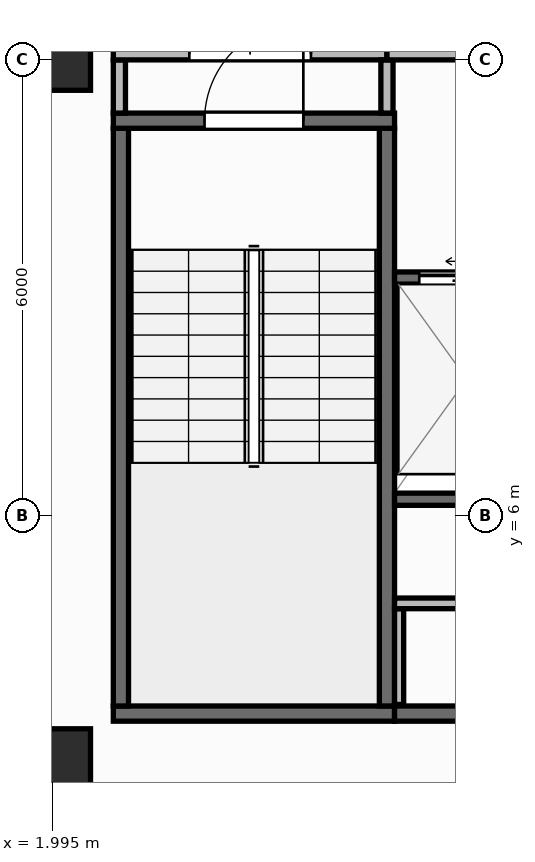
"""IFC4 building model, lengths in metres.
Left out: names, types, materials, properties, quantities, classifications, styles, units other than length and angle.
Written with IfcOpenShell. Run it as: python <this file> out.ifc"""

import sys

from ifc_helpers import new_model, si_unit, direction, frame, frame_2d, origin, origin_2d, place, context, subcontext, project, spatial, rectangle, extrude, element, fill, save


model = new_model("IFC4")
c1 = context("Model", 3, precision=1e-05, world=origin(), true_north=direction((0.0, 1.0)))
c2 = subcontext(c1, "Body", "Model", "MODEL_VIEW")
j1 = project(units=[si_unit("LENGTHUNIT", "METRE"), si_unit("PLANEANGLEUNIT", "RADIAN")], contexts=[c1])
p1 = place(None, origin())
s1 = spatial("IfcSite", under=j1, at=p1, CompositionType="ELEMENT")
p2 = place(p1, origin())
s2 = spatial("IfcBuilding", under=s1, at=p2, CompositionType="ELEMENT")
p3 = place(p2, frame((0.0, 0.0, 296.05)))
s3 = spatial("IfcBuildingStorey", under=s2, at=p3, CompositionType="ELEMENT", Elevation=296.05)
for number, where, z_axis, x_axis in (
    (1, (2.1, 2.8, 0.0), (0.0, 0.0, 1.0), (1.0, 0.0, 0.0)),
    (2, (2.1, 12.0, 0.0), (0.0, 0.0, 1.0), (1.0, 0.0, 0.0)),
):
    element("IfcColumn", number, at=place(p3, frame(where, z_axis=z_axis, x_axis=x_axis)), inside=s3, PredefinedType="COLUMN", context=c2, shape_type="SweptSolid", body=[
        extrude(rectangle(XDim=0.8, YDim=0.8, at=origin_2d()), origin(), (0.0, 0.0, 1.0), 3.95),
    ])
p4 = place(p3, frame((2.46, 0.171, 0.0), z_axis=(0.0, 0.0, 1.0), x_axis=(0.997760665813, 0.066885377746, 0.0)))
e3 = element("IfcWall", 3, at=p4, inside=s3, PredefinedType="STANDARD", context=c2, shape_type="SweptSolid", body=[
    extrude(rectangle(XDim=35.56, YDim=0.26, at=frame_2d((17.78, 0.0))), origin(), (0.0, 0.0, 1.0), 3.71),
])
p5 = place(p4, frame((16.58, 0.0, 0.9)))
e4 = element("IfcOpeningElement", 4, at=p5, cuts=e3, PredefinedType="OPENING", context=c2, shape_type="SweptSolid", body=[
    extrude(rectangle(XDim=2.4, YDim=1.65, at=frame_2d((1.2, 0.825))), frame((0.0, 0.14, 0.0), z_axis=(0.0, -1.0, 0.0), x_axis=(1.0, 0.0, 0.0)), (0.0, 0.0, 1.0), 0.28),
])
p6 = place(p3, frame((2.8, 3.4, 0.0), z_axis=(0.0, 0.0, 1.0), x_axis=(1.0, 0.0, 0.0)))
e5 = element("IfcWall", 5, at=p6, inside=s3, PredefinedType="SHEAR", context=c2, shape_type="SweptSolid", body=[
    extrude(rectangle(XDim=3.7, YDim=0.2, at=frame_2d((1.85, 0.0))), origin(), (0.0, 0.0, 1.0), 3.71),
])
for number, where, z_axis, x_axis in (
    (6, (2.9, 3.5, 0.0), (0.0, 0.0, 1.0), (0.0, 1.0, 0.0)),
    (7, (6.4, 3.5, 0.0), (0.0, 0.0, 1.0), (0.0, 1.0, 0.0)),
):
    element("IfcWall", number, at=place(p3, frame(where, z_axis=z_axis, x_axis=x_axis)), inside=s3, PredefinedType="SHEAR", context=c2, shape_type="SweptSolid", body=[
        extrude(rectangle(XDim=7.6, YDim=0.2, at=frame_2d((3.8, 0.0))), origin(), (0.0, 0.0, 1.0), 3.71),
    ])
p7 = place(p3, frame((2.8, 11.2, 0.0), z_axis=(0.0, 0.0, 1.0), x_axis=(1.0, 0.0, 0.0)))
e8 = element("IfcWall", 8, at=p7, inside=s3, PredefinedType="SHEAR", context=c2, shape_type="SweptSolid", body=[
    extrude(rectangle(XDim=3.7, YDim=0.2, at=frame_2d((1.85, 0.0))), origin(), (0.0, 0.0, 1.0), 3.71),
])
p8 = place(p7, frame((1.2, 0.0, 0.0)))
e9 = element("IfcOpeningElement", 9, at=p8, cuts=e8, PredefinedType="OPENING", context=c2, shape_type="SweptSolid", body=[
    extrude(rectangle(XDim=1.3, YDim=2.15, at=frame_2d((0.65, 1.075))), frame((0.0, 0.11, 0.0), z_axis=(0.0, -1.0, 0.0), x_axis=(1.0, 0.0, 0.0)), (0.0, 0.0, 1.0), 0.22),
])
p9 = place(p3, frame((6.5, 3.4, 0.0), z_axis=(0.0, 0.0, 1.0), x_axis=(1.0, 0.0, 0.0)))
e10 = element("IfcWall", 10, at=p9, inside=s3, PredefinedType="SHEAR", context=c2, shape_type="SweptSolid", body=[
    extrude(rectangle(XDim=13.7, YDim=0.2, at=frame_2d((6.85, 0.0))), origin(), (0.0, 0.0, 1.0), 3.71),
])
p10 = place(p3, frame((6.5, 6.22, 0.0), z_axis=(0.0, 0.0, 1.0), x_axis=(1.0, 0.0, 0.0)))
e11 = element("IfcWall", 11, at=p10, inside=s3, PredefinedType="SHEAR", context=c2, shape_type="SweptSolid", body=[
    extrude(rectangle(XDim=12.11, YDim=0.16, at=frame_2d((6.055, 0.0))), origin(), (0.0, 0.0, 1.0), 3.71),
])
p11 = place(p3, frame((6.5, 9.13, 0.0), z_axis=(0.0, 0.0, 1.0), x_axis=(1.0, 0.0, 0.0)))
e12 = element("IfcWall", 12, at=p11, inside=s3, PredefinedType="SHEAR", context=c2, shape_type="SweptSolid", body=[
    extrude(rectangle(XDim=1.975, YDim=0.16, at=frame_2d((0.988, 0.0))), origin(), (0.0, 0.0, 1.0), 3.71),
])
p12 = place(p11, frame((0.325, 0.0, 0.0)))
e13 = element("IfcOpeningElement", 13, at=p12, cuts=e12, PredefinedType="OPENING", context=c2, shape_type="SweptSolid", body=[
    extrude(rectangle(XDim=1.25, YDim=2.15, at=frame_2d((0.625, 1.075))), frame((0.0, 0.09, 0.0), z_axis=(0.0, -1.0, 0.0), x_axis=(1.0, 0.0, 0.0)), (0.0, 0.0, 1.0), 0.18),
])
p13 = place(p3, frame((6.56, 3.52, 0.0), z_axis=(0.0, 0.0, 1.0), x_axis=(0.0, 1.0, 0.0)))
e14 = element("IfcWall", 14, at=p13, inside=s3, PredefinedType="PARTITIONING", context=c2, shape_type="SweptSolid", body=[
    extrude(rectangle(XDim=1.26, YDim=0.12, at=frame_2d((0.63, 0.0))), origin(), (0.0, 0.0, 1.0), 3.71),
])
p14 = place(p3, frame((6.5, 4.85, 0.0), z_axis=(0.0, 0.0, 1.0), x_axis=(1.0, 0.0, 0.0)))
e15 = element("IfcWall", 15, at=p14, inside=s3, PredefinedType="PARTITIONING", context=c2, shape_type="SweptSolid", body=[
    extrude(rectangle(XDim=5.67, YDim=0.14, at=frame_2d((2.835, 0.0))), origin(), (0.0, 0.0, 1.0), 3.71),
])
p15 = place(p14, frame((2.285, 0.0, 0.0)))
e16 = element("IfcOpeningElement", 16, at=p15, cuts=e15, PredefinedType="OPENING", context=c2, shape_type="SweptSolid", body=[
    extrude(rectangle(XDim=1.1, YDim=2.1, at=frame_2d((0.55, 1.05))), frame((0.0, 0.08, 0.0), z_axis=(0.0, -1.0, 0.0), x_axis=(1.0, 0.0, 0.0)), (0.0, 0.0, 1.0), 0.16),
])
p16 = place(p3, frame((2.88, 11.3, 0.0), z_axis=(0.0, 0.0, 1.0), x_axis=(0.0, 1.0, 0.0)))
e17 = element("IfcWall", 17, at=p16, inside=s3, PredefinedType="PARTITIONING", context=c2, shape_type="SweptSolid", body=[
    extrude(rectangle(XDim=0.7, YDim=0.16, at=frame_2d((0.35, 0.0))), origin(), (0.0, 0.0, 1.0), 3.71),
])
p17 = place(p3, frame((2.8, 12.08, 0.0), z_axis=(0.0, 0.0, 1.0), x_axis=(1.0, 0.0, 0.0)))
e18 = element("IfcWall", 18, at=p17, inside=s3, PredefinedType="PARTITIONING", context=c2, shape_type="SweptSolid", body=[
    extrude(rectangle(XDim=3.6, YDim=0.16, at=frame_2d((1.8, 0.0))), origin(), (0.0, 0.0, 1.0), 3.157),
])
p18 = place(p17, frame((1.0, 0.0, 0.0)))
e19 = element("IfcOpeningElement", 19, at=p18, cuts=e18, PredefinedType="OPENING", context=c2, shape_type="SweptSolid", body=[
    extrude(rectangle(XDim=1.6, YDim=2.05, at=frame_2d((0.8, 1.025))), frame((0.0, 0.09, 0.0), z_axis=(0.0, -1.0, 0.0), x_axis=(1.0, 0.0, 0.0)), (0.0, 0.0, 1.0), 0.18),
])
p19 = place(p3, frame((6.4, 11.3, 0.0), z_axis=(0.0, 0.0, 1.0), x_axis=(0.0, 1.0, 0.0)))
e20 = element("IfcWall", 20, at=p19, inside=s3, PredefinedType="PARTITIONING", context=c2, shape_type="SweptSolid", body=[
    extrude(rectangle(XDim=0.7, YDim=0.16, at=frame_2d((0.35, 0.0))), origin(), (0.0, 0.0, 1.0), 3.71),
])
p20 = place(p3, frame((6.4, 12.08, 0.0), z_axis=(0.0, 0.0, 1.0), x_axis=(1.0, 0.0, 0.0)))
e21 = element("IfcWall", 21, at=p20, inside=s3, PredefinedType="PARTITIONING", context=c2, shape_type="SweptSolid", body=[
    extrude(rectangle(XDim=6.18, YDim=0.16, at=frame_2d((3.09, 0.0))), origin(), (0.0, 0.0, 1.0), 3.157),
])
p21 = place(p20, frame((2.29, 0.0, 0.0)))
e22 = element("IfcOpeningElement", 22, at=p21, cuts=e21, PredefinedType="OPENING", context=c2, shape_type="SweptSolid", body=[
    extrude(rectangle(XDim=1.6, YDim=2.05, at=frame_2d((0.8, 1.025))), frame((0.0, 0.09, 0.0), z_axis=(0.0, -1.0, 0.0), x_axis=(1.0, 0.0, 0.0)), (0.0, 0.0, 1.0), 0.18),
])
p22 = place(p8, origin())
e23 = element("IfcDoor", 23, at=p22, inside=s3, OperationType="SINGLE_SWING_RIGHT", PredefinedType="DOOR", context=c2, shape_type="SweptSolid", body=[
    extrude(rectangle(XDim=1.3, YDim=2.15, at=frame_2d((0.65, 1.075))), frame((0.0, 0.025, 0.0), z_axis=(0.0, -1.0, 0.0), x_axis=(1.0, 0.0, 0.0)), (0.0, 0.0, 1.0), 0.05),
])
fill(e9, e23)
p23 = place(p12, origin())
e24 = element("IfcDoor", 24, at=p23, inside=s3, OperationType="SLIDING_TO_LEFT", PredefinedType="DOOR", context=c2, shape_type="SweptSolid", body=[
    extrude(rectangle(XDim=1.25, YDim=2.15, at=frame_2d((0.625, 1.075))), frame((0.0, 0.025, 0.0), z_axis=(0.0, -1.0, 0.0), x_axis=(1.0, 0.0, 0.0)), (0.0, 0.0, 1.0), 0.05),
])
fill(e13, e24)
p24 = place(p18, origin())
e25 = element("IfcDoor", 25, at=p24, inside=s3, OperationType="DOUBLE_DOOR_SINGLE_SWING", PredefinedType="DOOR", context=c2, shape_type="SweptSolid", body=[
    extrude(rectangle(XDim=1.6, YDim=2.05, at=frame_2d((0.8, 1.025))), frame((0.0, 0.025, 0.0), z_axis=(0.0, -1.0, 0.0), x_axis=(1.0, 0.0, 0.0)), (0.0, 0.0, 1.0), 0.05),
])
fill(e19, e25)
save(model, sys.argv[1])
